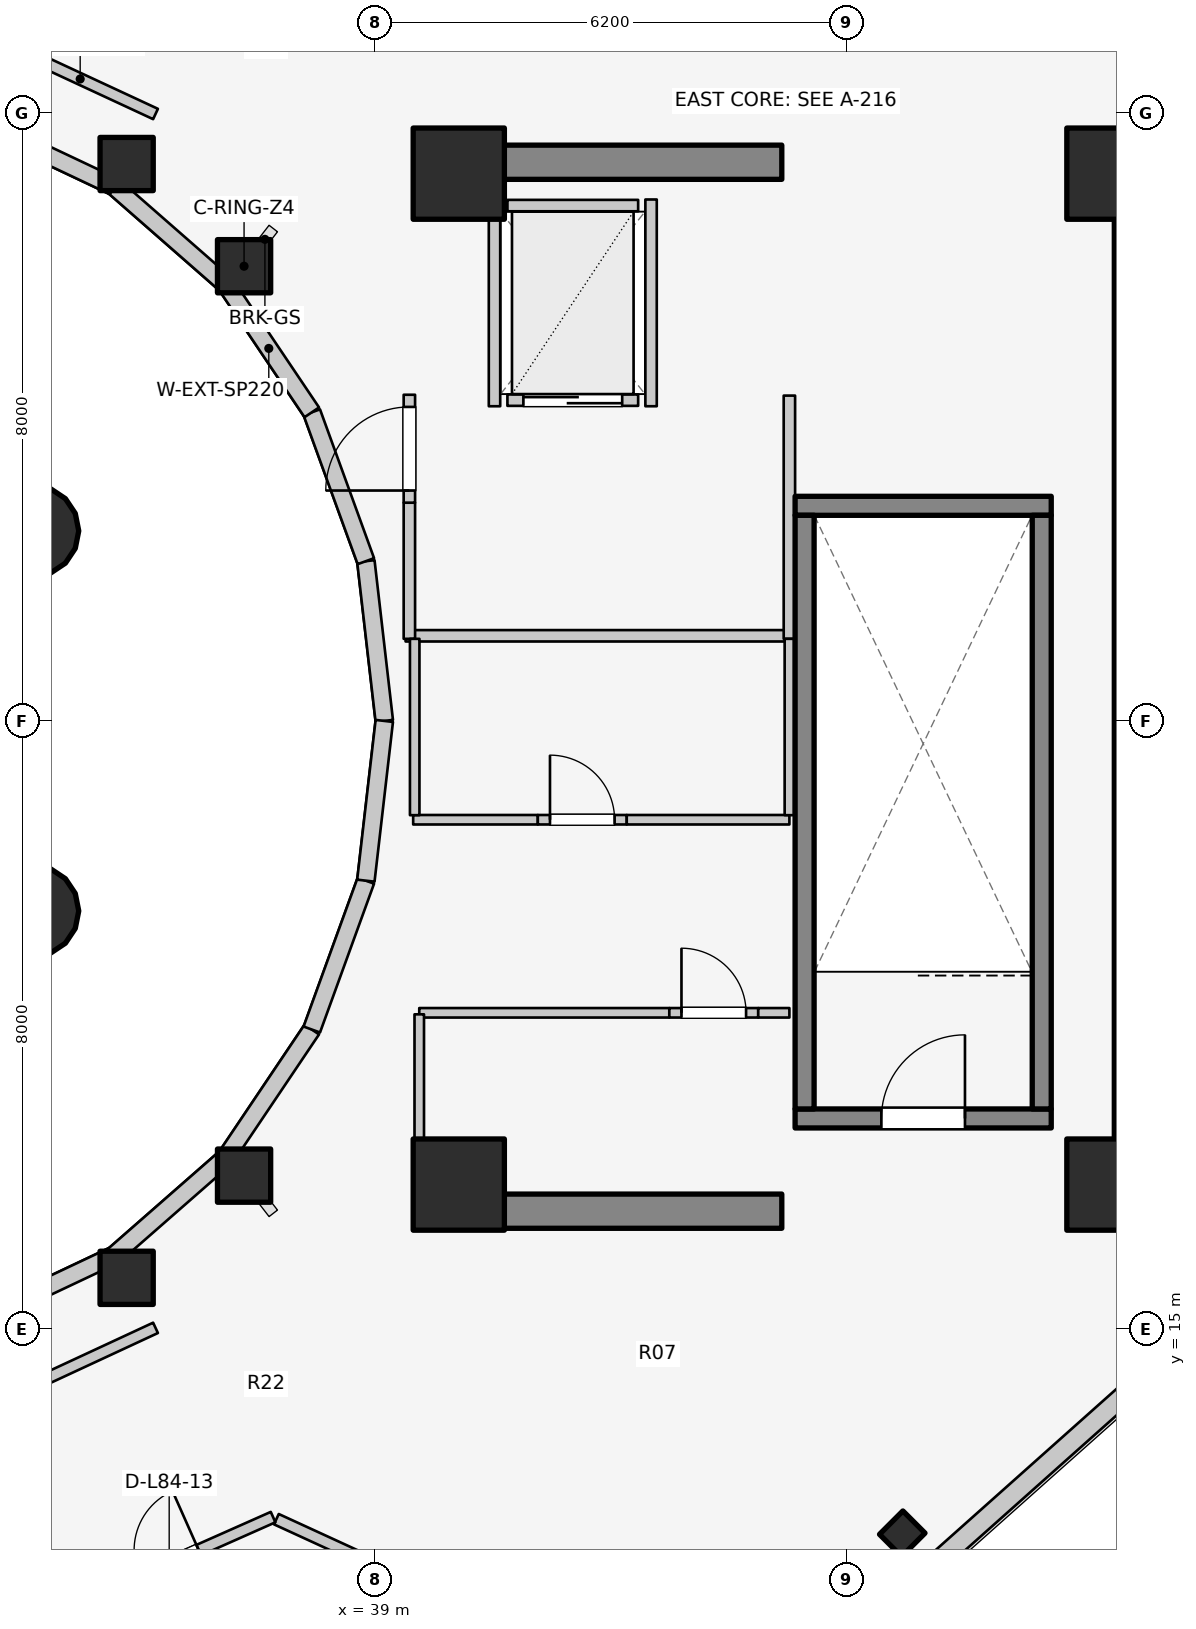
"""IFC4 building model, lengths in metres.
Left out: names, types, materials, properties, quantities, classifications, styles, units other than length and angle.
Written with IfcOpenShell. Run it as: python <this file> out.ifc"""

import sys

from ifc_helpers import new_model, si_unit, direction, frame, frame_2d, origin, origin_2d, place, context, subcontext, project, spatial, rectangle, hollow_circle, i_section, extrude, element, fill, save


model = new_model("IFC4")
c1 = context("Model", 3, precision=1e-05, world=origin(), true_north=direction((0.0, 1.0)))
c2 = subcontext(c1, "Body", "Model", "MODEL_VIEW")
j1 = project(units=[si_unit("LENGTHUNIT", "METRE"), si_unit("PLANEANGLEUNIT", "RADIAN")], contexts=[c1])
p1 = place(None, origin())
s1 = spatial("IfcSite", under=j1, at=p1, CompositionType="ELEMENT")
p2 = place(p1, origin())
s2 = spatial("IfcBuilding", under=s1, at=p2, CompositionType="ELEMENT")
p3 = place(p2, frame((0.0, 0.0, 276.4)))
s3 = spatial("IfcBuildingStorey", under=s2, at=p3, CompositionType="ELEMENT", Elevation=276.4)
p4 = place(p3, frame((48.95, 17.05, 0.0), z_axis=(0.0, 0.0, 1.0), x_axis=(0.0, 1.0, 0.0)))
e1 = element("IfcWall", 1, at=p4, inside=s3, PredefinedType="SHEAR", context=c2, shape_type="SweptSolid", body=[
    extrude(rectangle(XDim=12.8, YDim=0.45, at=frame_2d((6.4, 0.0))), origin(), (0.0, 0.0, 1.0), 3.2),
])
for number, where, z_axis, x_axis in (
    (2, (39.85, 16.55, 0.0), (0.0, 0.0, 1.0), (1.0, 0.0, 0.0)),
    (3, (39.85, 30.35, 0.0), (0.0, 0.0, 1.0), (1.0, 0.0, 0.0)),
):
    element("IfcWall", number, at=place(p3, frame(where, z_axis=z_axis, x_axis=x_axis)), inside=s3, PredefinedType="SHEAR", context=c2, shape_type="SweptSolid", body=[
        extrude(rectangle(XDim=4.5, YDim=0.45, at=frame_2d((2.25, 0.0))), origin(), (0.0, 0.0, 1.0), 3.2),
    ])
p5 = place(p3, frame((44.525, 17.77, 0.0), z_axis=(0.0, 0.0, 1.0), x_axis=(1.0, 0.0, 0.0)))
e4 = element("IfcWall", 4, at=p5, inside=s3, PredefinedType="SOLIDWALL", context=c2, shape_type="SweptSolid", body=[
    extrude(rectangle(XDim=3.37, YDim=0.25, at=frame_2d((1.685, 0.0))), origin(), (0.0, 0.0, 1.0), 3.2),
])
p6 = place(p5, frame((1.135, 0.0, 0.0)))
e5 = element("IfcOpeningElement", 5, at=p6, cuts=e4, PredefinedType="OPENING", context=c2, shape_type="SweptSolid", body=[
    extrude(rectangle(XDim=1.1, YDim=2.1, at=frame_2d((0.55, 1.05))), frame((0.0, 0.135, 0.0), z_axis=(0.0, -1.0, 0.0), x_axis=(1.0, 0.0, 0.0)), (0.0, 0.0, 1.0), 0.27),
])
p7 = place(p3, frame((44.525, 25.83, 0.0), z_axis=(0.0, 0.0, 1.0), x_axis=(1.0, 0.0, 0.0)))
e6 = element("IfcWall", 6, at=p7, inside=s3, PredefinedType="SOLIDWALL", context=c2, shape_type="SweptSolid", body=[
    extrude(rectangle(XDim=3.37, YDim=0.25, at=frame_2d((1.685, 0.0))), origin(), (0.0, 0.0, 1.0), 3.2),
])
for number, where, z_axis, x_axis in (
    (7, (44.65, 17.895, 0.0), (0.0, 0.0, 1.0), (0.0, 1.0, 0.0)),
    (8, (47.77, 17.895, 0.0), (0.0, 0.0, 1.0), (0.0, 1.0, 0.0)),
):
    element("IfcWall", number, at=place(p3, frame(where, z_axis=z_axis, x_axis=x_axis)), inside=s3, PredefinedType="SOLIDWALL", context=c2, shape_type="SweptSolid", body=[
        extrude(rectangle(XDim=7.81, YDim=0.25, at=frame_2d((3.905, 0.0))), origin(), (0.0, 0.0, 1.0), 3.2),
    ])
for number, where, z_axis, x_axis in (
    (9, (40.1, 16.9, 0.0), (0.0, 0.0, 1.0), (1.0, 0.0, 0.0)),
    (10, (48.7, 16.9, 0.0), (0.0, 0.0, 1.0), (1.0, 0.0, 0.0)),
    (11, (48.7, 30.2, 0.0), (0.0, 0.0, 1.0), (1.0, 0.0, 0.0)),
    (12, (40.1, 30.2, 0.0), (0.0, 0.0, 1.0), (1.0, 0.0, 0.0)),
):
    element("IfcColumn", number, at=place(p3, frame(where, z_axis=z_axis, x_axis=x_axis)), inside=s3, PredefinedType="COLUMN", context=c2, shape_type="SweptSolid", body=[
        extrude(rectangle(XDim=1.2, YDim=1.2, at=origin_2d()), origin(), (0.0, 0.0, 1.0), 3.2),
    ])
for number, where, z_axis, x_axis in (
    (13, (37.275, 28.982, 0.0), (0.0, 0.0, 1.0), (1.0, 0.0, 0.0)),
    (14, (35.73, 30.327, 0.0), (0.0, 0.0, 1.0), (1.0, 0.0, 0.0)),
    (15, (35.73, 15.673, 0.0), (0.0, 0.0, 1.0), (1.0, 0.0, 0.0)),
    (16, (37.275, 17.018, 0.0), (0.0, 0.0, 1.0), (1.0, 0.0, 0.0)),
):
    element("IfcColumn", number, at=place(p3, frame(where, z_axis=z_axis, x_axis=x_axis)), inside=s3, PredefinedType="COLUMN", context=c2, shape_type="SweptSolid", body=[
        extrude(rectangle(XDim=0.7, YDim=0.7, at=origin_2d()), origin(), (0.0, 0.0, 1.0), 3.2),
    ])
p8 = place(p3, frame((45.935, 12.307, 0.0), z_axis=(0.0, 0.0, 1.0), x_axis=(0.707106781187, -0.707106781187, 0.0)))
e17 = element("IfcColumn", 17, at=p8, inside=s3, PredefinedType="COLUMN", context=c2, shape_type="SweptSolid", body=[
    extrude(i_section(OverallWidth=0.412, OverallDepth=0.435, WebThickness=0.036, FlangeThickness=0.057, FilletRadius=0.025, at=origin_2d()), origin(), (0.0, 0.0, 1.0), 3.2),
])
for number, where, z_axis, x_axis in (
    (18, (34.5, 20.5, 0.0), (0.0, 0.0, 1.0), (1.0, 0.0, 0.0)),
    (19, (34.5, 25.5, 0.0), (0.0, 0.0, 1.0), (1.0, 0.0, 0.0)),
):
    element("IfcColumn", number, at=place(p3, frame(where, z_axis=z_axis, x_axis=x_axis)), inside=s3, PredefinedType="PILASTER", context=c2, shape_type="SweptSolid", body=[
        extrude(hollow_circle(Radius=0.6, WallThickness=0.032, at=origin_2d()), origin(), (0.0, 0.0, 1.0), 3.2),
    ])
p9 = place(p3, frame((39.12, 23.0, 0.0), z_axis=(0.0, 0.0, 1.0), x_axis=(-0.114711713601, 0.993398823617, 0.0)))
e20 = element("IfcWall", 20, at=p9, inside=s3, PredefinedType="STANDARD", context=c2, shape_type="SweptSolid", body=[
    extrude(rectangle(XDim=2.115, YDim=0.23, at=frame_2d((1.058, 0.0))), origin(), (0.0, 0.0, 1.0), 2.91),
])
p10 = place(p3, frame((38.877, 25.102, 0.0), z_axis=(0.0, 0.0, 1.0), x_axis=(-0.341423187295, 0.93990968033, 0.0)))
e21 = element("IfcWall", 21, at=p10, inside=s3, PredefinedType="STANDARD", context=c2, shape_type="SweptSolid", body=[
    extrude(rectangle(XDim=2.084, YDim=0.23, at=frame_2d((1.042, 0.0))), origin(), (0.0, 0.0, 1.0), 2.91),
])
p11 = place(p3, frame((38.166, 27.06, 0.0), z_axis=(0.0, 0.0, 1.0), x_axis=(-0.558197800898, 0.829707909492, 0.0)))
e22 = element("IfcWall", 22, at=p11, inside=s3, PredefinedType="STANDARD", context=c2, shape_type="SweptSolid", body=[
    extrude(rectangle(XDim=2.027, YDim=0.23, at=frame_2d((1.013, 0.0))), origin(), (0.0, 0.0, 1.0), 2.23),
])
p12 = place(p3, frame((37.035, 28.742, 0.0), z_axis=(0.0, 0.0, 1.0), x_axis=(-0.752576694707, 0.658504607869, 0.0)))
e23 = element("IfcWall", 23, at=p12, inside=s3, PredefinedType="STANDARD", context=c2, shape_type="SweptSolid", body=[
    extrude(rectangle(XDim=1.959, YDim=0.23, at=frame_2d((0.98, 0.0))), origin(), (0.0, 0.0, 1.0), 2.23),
])
for number, where, z_axis, x_axis in (
    (24, (35.56, 30.032, 0.0), (0.0, 0.0, 1.0), (-0.904, 0.427, 0.0)),
    (25, (33.843, 15.157, 0.0), (0.0, 0.0, 1.0), (0.904, 0.427, 0.0)),
):
    element("IfcWall", number, at=place(p3, frame(where, z_axis=z_axis, x_axis=x_axis)), inside=s3, PredefinedType="STANDARD", context=c2, shape_type="SweptSolid", body=[
        extrude(rectangle(XDim=1.899, YDim=0.23, at=frame_2d((0.95, 0.0))), origin(), (0.0, 0.0, 1.0), 2.23),
    ])
p13 = place(p3, frame((35.56, 15.968, 0.0), z_axis=(0.0, 0.0, 1.0), x_axis=(0.752576694707, 0.658504607869, 0.0)))
e26 = element("IfcWall", 26, at=p13, inside=s3, PredefinedType="STANDARD", context=c2, shape_type="SweptSolid", body=[
    extrude(rectangle(XDim=1.959, YDim=0.23, at=frame_2d((0.98, 0.0))), origin(), (0.0, 0.0, 1.0), 2.23),
])
p14 = place(p3, frame((37.035, 17.258, 0.0), z_axis=(0.0, 0.0, 1.0), x_axis=(0.558197800898, 0.829707909492, 0.0)))
e27 = element("IfcWall", 27, at=p14, inside=s3, PredefinedType="STANDARD", context=c2, shape_type="SweptSolid", body=[
    extrude(rectangle(XDim=2.027, YDim=0.23, at=frame_2d((1.013, 0.0))), origin(), (0.0, 0.0, 1.0), 2.23),
])
p15 = place(p3, frame((38.166, 18.94, 0.0), z_axis=(0.0, 0.0, 1.0), x_axis=(0.341423187295, 0.93990968033, 0.0)))
e28 = element("IfcWall", 28, at=p15, inside=s3, PredefinedType="STANDARD", context=c2, shape_type="SweptSolid", body=[
    extrude(rectangle(XDim=2.084, YDim=0.23, at=frame_2d((1.042, 0.0))), origin(), (0.0, 0.0, 1.0), 2.91),
])
p16 = place(p3, frame((38.877, 20.898, 0.0), z_axis=(0.0, 0.0, 1.0), x_axis=(0.114711713601, 0.993398823617, 0.0)))
e29 = element("IfcWall", 29, at=p16, inside=s3, PredefinedType="STANDARD", context=c2, shape_type="SweptSolid", body=[
    extrude(rectangle(XDim=2.115, YDim=0.23, at=frame_2d((1.058, 0.0))), origin(), (0.0, 0.0, 1.0), 2.91),
])
p17 = place(p3, frame((46.348, 11.894, 0.0), z_axis=(0.0, 0.0, 1.0), x_axis=(0.746567900399, 0.665309228926, 0.0)))
e30 = element("IfcWall", 30, at=p17, inside=s3, PredefinedType="STANDARD", context=c2, shape_type="SweptSolid", body=[
    extrude(rectangle(XDim=3.957, YDim=0.26, at=frame_2d((1.979, 0.0))), origin(), (0.0, 0.0, 1.0), 2.95),
])
p18 = place(p3, frame((40.74, 27.22, 0.0), z_axis=(0.0, 0.0, 1.0), x_axis=(1.0, 0.0, 0.0)))
e31 = element("IfcWall", 31, at=p18, inside=s3, PredefinedType="SOLIDWALL", context=c2, shape_type="SweptSolid", body=[
    extrude(rectangle(XDim=1.72, YDim=0.15, at=frame_2d((0.86, 0.0))), origin(), (0.0, 0.0, 1.0), 2.925),
])
p19 = place(p18, frame((0.21, 0.0, 0.0)))
e32 = element("IfcOpeningElement", 32, at=p19, cuts=e31, PredefinedType="OPENING", context=c2, shape_type="SweptSolid", body=[
    extrude(rectangle(XDim=1.3, YDim=2.1, at=frame_2d((0.65, 1.05))), frame((0.0, 0.085, 0.0), z_axis=(0.0, -1.0, 0.0), x_axis=(1.0, 0.0, 0.0)), (0.0, 0.0, 1.0), 0.17),
])
p20 = place(p3, frame((40.74, 29.78, 0.0), z_axis=(0.0, 0.0, 1.0), x_axis=(1.0, 0.0, 0.0)))
e33 = element("IfcWall", 33, at=p20, inside=s3, PredefinedType="SOLIDWALL", context=c2, shape_type="SweptSolid", body=[
    extrude(rectangle(XDim=1.72, YDim=0.15, at=frame_2d((0.86, 0.0))), origin(), (0.0, 0.0, 1.0), 2.925),
])
p21 = place(p3, frame((40.57, 27.14, 0.0), z_axis=(0.0, 0.0, 1.0), x_axis=(0.0, 1.0, 0.0)))
e34 = element("IfcWall", 34, at=p21, inside=s3, PredefinedType="SOLIDWALL", context=c2, shape_type="SweptSolid", body=[
    extrude(rectangle(XDim=2.72, YDim=0.15, at=frame_2d((1.36, 0.0))), origin(), (0.0, 0.0, 1.0), 1.57),
])
p22 = place(p3, frame((42.63, 27.14, 0.0), z_axis=(0.0, 0.0, 1.0), x_axis=(0.0, 1.0, 0.0)))
e35 = element("IfcWall", 35, at=p22, inside=s3, PredefinedType="SOLIDWALL", context=c2, shape_type="SweptSolid", body=[
    extrude(rectangle(XDim=2.72, YDim=0.15, at=frame_2d((1.36, 0.0))), origin(), (0.0, 0.0, 1.0), 2.925),
])
p23 = place(p3, frame((39.4, 24.12, 0.0), z_axis=(0.0, 0.0, 1.0), x_axis=(1.0, 0.0, 0.0)))
e36 = element("IfcWall", 36, at=p23, inside=s3, PredefinedType="PARTITIONING", context=c2, shape_type="SweptSolid", body=[
    extrude(rectangle(XDim=5.08, YDim=0.15, at=frame_2d((2.54, 0.0))), origin(), (0.0, 0.0, 1.0), 1.57),
])
p24 = place(p3, frame((44.45, 24.08, 0.0), z_axis=(0.0, 0.0, 1.0), x_axis=(0.0, 1.0, 0.0)))
e37 = element("IfcWall", 37, at=p24, inside=s3, PredefinedType="PARTITIONING", context=c2, shape_type="SweptSolid", body=[
    extrude(rectangle(XDim=3.2, YDim=0.15, at=frame_2d((1.6, 0.0))), origin(), (0.0, 0.0, 1.0), 2.925),
])
p25 = place(p3, frame((39.45, 24.08, 0.0), z_axis=(0.0, 0.0, 1.0), x_axis=(0.0, 1.0, 0.0)))
e38 = element("IfcWall", 38, at=p25, inside=s3, PredefinedType="PARTITIONING", context=c2, shape_type="SweptSolid", body=[
    extrude(rectangle(XDim=1.791, YDim=0.15, at=frame_2d((0.896, 0.0))), origin(), (0.0, 0.0, 1.0), 1.57),
])
p26 = place(p3, frame((39.45, 25.871, 0.0), z_axis=(0.0, 0.0, 1.0), x_axis=(0.0, 1.0, 0.0)))
e39 = element("IfcWall", 39, at=p26, inside=s3, PredefinedType="PARTITIONING", context=c2, shape_type="SweptSolid", body=[
    extrude(rectangle(XDim=1.42, YDim=0.15, at=frame_2d((0.71, 0.0))), origin(), (0.0, 0.0, 1.0), 2.16),
])
p27 = place(p26, frame((0.16, 0.0, 0.0)))
e40 = element("IfcOpeningElement", 40, at=p27, cuts=e39, PredefinedType="OPENING", context=c2, shape_type="SweptSolid", body=[
    extrude(rectangle(XDim=1.1, YDim=2.1, at=frame_2d((0.55, 1.05))), frame((0.0, 0.085, 0.0), z_axis=(0.0, -1.0, 0.0), x_axis=(1.0, 0.0, 0.0)), (0.0, 0.0, 1.0), 0.17),
])
p28 = place(p3, frame((39.58, 19.16, 0.0), z_axis=(0.0, 0.0, 1.0), x_axis=(1.0, 0.0, 0.0)))
e41 = element("IfcWall", 41, at=p28, inside=s3, PredefinedType="PARTITIONING", context=c2, shape_type="SweptSolid", body=[
    extrude(rectangle(XDim=3.29, YDim=0.125, at=frame_2d((1.645, 0.0))), origin(), (0.0, 0.0, 1.0), 1.57),
])
p29 = place(p3, frame((42.87, 19.16, 0.0), z_axis=(0.0, 0.0, 1.0), x_axis=(1.0, 0.0, 0.0)))
e42 = element("IfcWall", 42, at=p29, inside=s3, PredefinedType="PARTITIONING", context=c2, shape_type="SweptSolid", body=[
    extrude(rectangle(XDim=1.17, YDim=0.125, at=frame_2d((0.585, 0.0))), origin(), (0.0, 0.0, 1.0), 2.925),
])
p30 = place(p29, frame((0.16, 0.0, 0.0)))
e43 = element("IfcOpeningElement", 43, at=p30, cuts=e42, PredefinedType="OPENING", context=c2, shape_type="SweptSolid", body=[
    extrude(rectangle(XDim=0.85, YDim=2.05, at=frame_2d((0.425, 1.025))), frame((0.0, 0.073, 0.0), z_axis=(0.0, -1.0, 0.0), x_axis=(1.0, 0.0, 0.0)), (0.0, 0.0, 1.0), 0.145),
])
p31 = place(p3, frame((44.04, 19.16, 0.0), z_axis=(0.0, 0.0, 1.0), x_axis=(1.0, 0.0, 0.0)))
e44 = element("IfcWall", 44, at=p31, inside=s3, PredefinedType="PARTITIONING", context=c2, shape_type="SweptSolid", body=[
    extrude(rectangle(XDim=0.41, YDim=0.125, at=frame_2d((0.205, 0.0))), origin(), (0.0, 0.0, 1.0), 2.925),
])
p32 = place(p3, frame((39.58, 17.1, 0.0), z_axis=(0.0, 0.0, 1.0), x_axis=(0.0, 1.0, 0.0)))
e45 = element("IfcWall", 45, at=p32, inside=s3, PredefinedType="PARTITIONING", context=c2, shape_type="SweptSolid", body=[
    extrude(rectangle(XDim=2.04, YDim=0.125, at=frame_2d((1.02, 0.0))), origin(), (0.0, 0.0, 1.0), 1.57),
])
p33 = place(p3, frame((39.5, 21.7, 0.0), z_axis=(0.0, 0.0, 1.0), x_axis=(1.0, 0.0, 0.0)))
e46 = element("IfcWall", 46, at=p33, inside=s3, PredefinedType="PARTITIONING", context=c2, shape_type="SweptSolid", body=[
    extrude(rectangle(XDim=1.64, YDim=0.125, at=frame_2d((0.82, 0.0))), origin(), (0.0, 0.0, 1.0), 1.57),
])
p34 = place(p3, frame((41.14, 21.7, 0.0), z_axis=(0.0, 0.0, 1.0), x_axis=(1.0, 0.0, 0.0)))
e47 = element("IfcWall", 47, at=p34, inside=s3, PredefinedType="PARTITIONING", context=c2, shape_type="SweptSolid", body=[
    extrude(rectangle(XDim=1.17, YDim=0.125, at=frame_2d((0.585, 0.0))), origin(), (0.0, 0.0, 1.0), 2.925),
])
p35 = place(p34, frame((0.16, 0.0, 0.0)))
e48 = element("IfcOpeningElement", 48, at=p35, cuts=e47, PredefinedType="OPENING", context=c2, shape_type="SweptSolid", body=[
    extrude(rectangle(XDim=0.85, YDim=2.05, at=frame_2d((0.425, 1.025))), frame((0.0, 0.073, 0.0), z_axis=(0.0, -1.0, 0.0), x_axis=(1.0, 0.0, 0.0)), (0.0, 0.0, 1.0), 0.145),
])
p36 = place(p3, frame((42.31, 21.7, 0.0), z_axis=(0.0, 0.0, 1.0), x_axis=(1.0, 0.0, 0.0)))
e49 = element("IfcWall", 49, at=p36, inside=s3, PredefinedType="PARTITIONING", context=c2, shape_type="SweptSolid", body=[
    extrude(rectangle(XDim=2.14, YDim=0.125, at=frame_2d((1.07, 0.0))), origin(), (0.0, 0.0, 1.0), 2.925),
])
p37 = place(p3, frame((39.52, 21.76, 0.0), z_axis=(0.0, 0.0, 1.0), x_axis=(0.0, 1.0, 0.0)))
e50 = element("IfcWall", 50, at=p37, inside=s3, PredefinedType="PARTITIONING", context=c2, shape_type="SweptSolid", body=[
    extrude(rectangle(XDim=2.32, YDim=0.125, at=frame_2d((1.16, 0.0))), origin(), (0.0, 0.0, 1.0), 1.57),
])
p38 = place(p3, frame((44.45, 21.76, 0.0), z_axis=(0.0, 0.0, 1.0), x_axis=(0.0, 1.0, 0.0)))
e51 = element("IfcWall", 51, at=p38, inside=s3, PredefinedType="PARTITIONING", context=c2, shape_type="SweptSolid", body=[
    extrude(rectangle(XDim=2.32, YDim=0.125, at=frame_2d((1.16, 0.0))), origin(), (0.0, 0.0, 1.0), 2.925),
])
for number, where, z_axis, x_axis in (
    (52, (36.11, 30.985, 0.0), (0.0, 0.0, 1.0), (-0.907, 0.421, 0.0)),
    (53, (34.127, 14.094, 0.0), (0.0, 0.0, 1.0), (0.907, 0.421, 0.0)),
):
    element("IfcWall", number, at=place(p3, frame(where, z_axis=z_axis, x_axis=x_axis)), inside=s3, PredefinedType="PARTITIONING", context=c2, shape_type="SweptSolid", body=[
        extrude(rectangle(XDim=2.186, YDim=0.15, at=frame_2d((1.093, 0.0))), origin(), (0.0, 0.0, 1.0), 2.501),
    ])
p39 = place(p3, frame((37.7, 12.498, 0.0), z_axis=(0.0, 0.0, 1.0), x_axis=(0.908705087361, -0.417438695144, 0.0)))
e54 = element("IfcWall", 54, at=p39, inside=s3, PredefinedType="PARTITIONING", context=c2, shape_type="SweptSolid", body=[
    extrude(rectangle(XDim=5.317, YDim=0.15, at=frame_2d((2.659, 0.0))), origin(), (0.0, 0.0, 1.0), 2.455),
])
p40 = place(p3, frame((34.923, 11.312, 0.0), z_axis=(0.0, 0.0, 1.0), x_axis=(0.913989848226, 0.405737054432, 0.0)))
e55 = element("IfcWall", 55, at=p40, inside=s3, PredefinedType="PARTITIONING", context=c2, shape_type="SweptSolid", body=[
    extrude(rectangle(XDim=2.991, YDim=0.15, at=frame_2d((1.496, 0.0))), origin(), (0.0, 0.0, 1.0), 2.455),
])
p41 = place(p40, frame((1.071, 0.0, 0.0)))
e56 = element("IfcOpeningElement", 56, at=p41, cuts=e55, PredefinedType="OPENING", context=c2, shape_type="SweptSolid", body=[
    extrude(rectangle(XDim=0.85, YDim=2.05, at=frame_2d((0.425, 1.025))), frame((0.0, 0.085, 0.0), z_axis=(0.0, -1.0, 0.0), x_axis=(1.0, 0.0, 0.0)), (0.0, 0.0, 1.0), 0.17),
])
p42 = place(p6, origin())
e57 = element("IfcDoor", 57, at=p42, inside=s3, OperationType="SINGLE_SWING_RIGHT", PredefinedType="DOOR", context=c2, shape_type="SweptSolid", body=[
    extrude(rectangle(XDim=1.1, YDim=2.1, at=frame_2d((0.55, 1.05))), frame((0.0, 0.025, 0.0), z_axis=(0.0, -1.0, 0.0), x_axis=(1.0, 0.0, 0.0)), (0.0, 0.0, 1.0), 0.05),
])
fill(e5, e57)
p43 = place(p19, origin())
e58 = element("IfcDoor", 58, at=p43, inside=s3, OperationType="DOUBLE_DOOR_SLIDING", PredefinedType="DOOR", context=c2, shape_type="SweptSolid", body=[
    extrude(rectangle(XDim=1.3, YDim=2.1, at=frame_2d((0.65, 1.05))), frame((0.0, 0.025, 0.0), z_axis=(0.0, -1.0, 0.0), x_axis=(1.0, 0.0, 0.0)), (0.0, 0.0, 1.0), 0.05),
])
fill(e32, e58)
p44 = place(p27, origin())
e59 = element("IfcDoor", 59, at=p44, inside=s3, OperationType="SINGLE_SWING_LEFT", PredefinedType="DOOR", context=c2, shape_type="SweptSolid", body=[
    extrude(rectangle(XDim=1.1, YDim=2.1, at=frame_2d((0.55, 1.05))), frame((0.0, 0.025, 0.0), z_axis=(0.0, -1.0, 0.0), x_axis=(1.0, 0.0, 0.0)), (0.0, 0.0, 1.0), 0.05),
])
fill(e40, e59)
p45 = place(p30, origin())
e60 = element("IfcDoor", 60, at=p45, inside=s3, OperationType="SINGLE_SWING_LEFT", PredefinedType="DOOR", context=c2, shape_type="SweptSolid", body=[
    extrude(rectangle(XDim=0.85, YDim=2.05, at=frame_2d((0.425, 1.025))), frame((0.0, 0.025, 0.0), z_axis=(0.0, -1.0, 0.0), x_axis=(1.0, 0.0, 0.0)), (0.0, 0.0, 1.0), 0.05),
])
fill(e43, e60)
p46 = place(p35, origin())
e61 = element("IfcDoor", 61, at=p46, inside=s3, OperationType="SINGLE_SWING_LEFT", PredefinedType="DOOR", context=c2, shape_type="SweptSolid", body=[
    extrude(rectangle(XDim=0.85, YDim=2.05, at=frame_2d((0.425, 1.025))), frame((0.0, 0.025, 0.0), z_axis=(0.0, -1.0, 0.0), x_axis=(1.0, 0.0, 0.0)), (0.0, 0.0, 1.0), 0.05),
])
fill(e48, e61)
p47 = place(p41, origin())
e62 = element("IfcDoor", 62, at=p47, inside=s3, OperationType="SINGLE_SWING_RIGHT", PredefinedType="DOOR", context=c2, shape_type="SweptSolid", body=[
    extrude(rectangle(XDim=0.85, YDim=2.05, at=frame_2d((0.425, 1.025))), frame((0.0, 0.025, 0.0), z_axis=(0.0, -1.0, 0.0), x_axis=(1.0, 0.0, 0.0)), (0.0, 0.0, 1.0), 0.05),
])
fill(e56, e62)
save(model, sys.argv[1])
